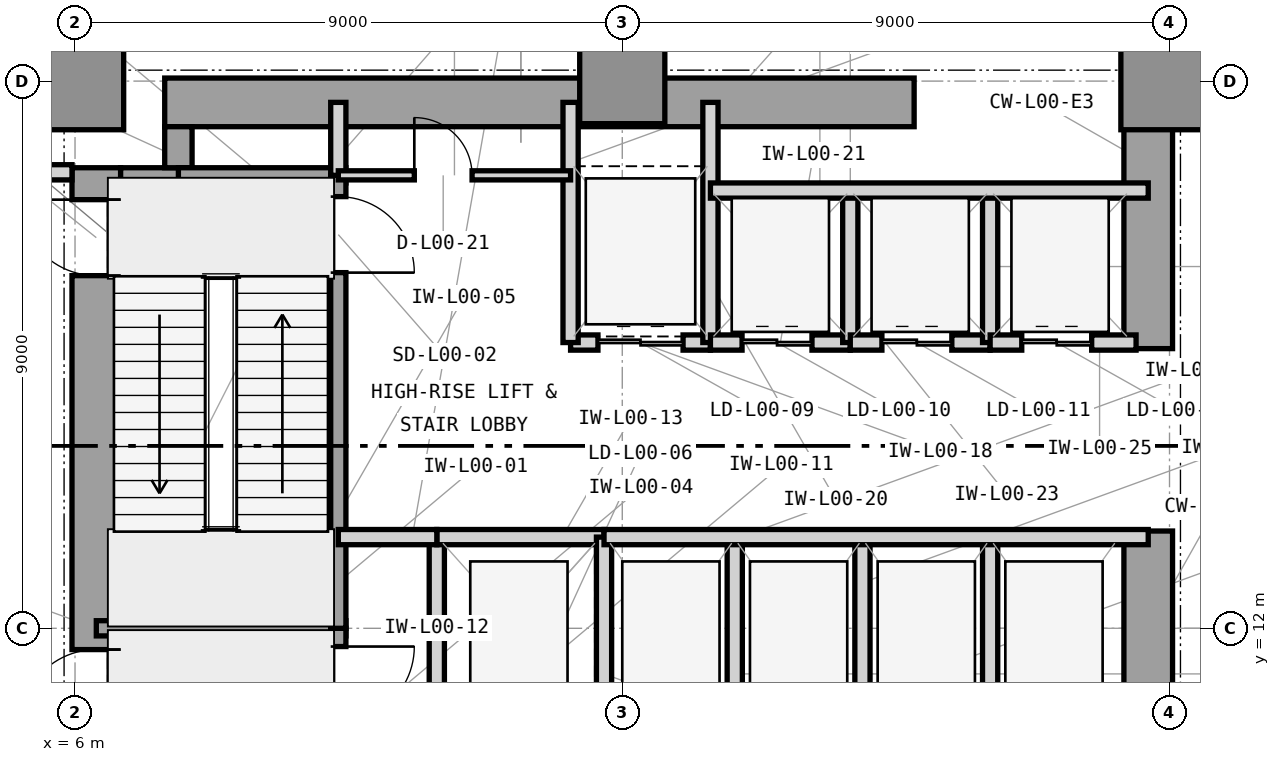
"""IFC4 building model, lengths in metres.
Left out: names, types, materials, properties, quantities, classifications, styles, units other than length and angle.
Written with IfcOpenShell. Run it as: python <this file> out.ifc"""

import sys

from ifc_helpers import new_model, si_unit, direction, frame, frame_2d, origin, origin_2d, place, context, subcontext, project, spatial, rectangle, extrude, element, fill, save


model = new_model("IFC4")
c1 = context("Model", 3, precision=1e-05, world=origin(), true_north=direction((0.0, 1.0)))
c2 = subcontext(c1, "Body", "Model", "MODEL_VIEW")
j1 = project(units=[si_unit("LENGTHUNIT", "METRE"), si_unit("PLANEANGLEUNIT", "RADIAN")], contexts=[c1])
p1 = place(None, origin())
s1 = spatial("IfcSite", under=j1, at=p1, CompositionType="ELEMENT")
p2 = place(p1, origin())
s2 = spatial("IfcBuilding", under=s1, at=p2, CompositionType="ELEMENT")
p3 = place(p2, origin())
s3 = spatial("IfcBuildingStorey", under=s2, at=p3, CompositionType="ELEMENT", Elevation=0.0)
p4 = place(p3, frame((6.35, 4.425, 0.0), z_axis=(0.0, 0.0, 1.0), x_axis=(0.0, 1.0, 0.0)))
e1 = element("IfcWall", 1, at=p4, inside=s3, PredefinedType="SHEAR", context=c2, shape_type="SweptSolid", body=[
    extrude(rectangle(XDim=15.15, YDim=0.8, at=frame_2d((7.575, 0.0))), origin(), (0.0, 0.0, 1.0), 5.4),
])
p5 = place(p4, frame((5.975, 0.0, 0.0)))
e2 = element("IfcOpeningElement", 2, at=p5, cuts=e1, PredefinedType="OPENING", context=c2, shape_type="SweptSolid", body=[
    extrude(rectangle(XDim=1.25, YDim=2.2, at=frame_2d((0.625, 1.1))), frame((0.0, 0.41, 0.0), z_axis=(0.0, -1.0, 0.0), x_axis=(1.0, 0.0, 0.0)), (0.0, 0.0, 1.0), 0.82),
])
p6 = place(p4, frame((13.375, 0.0, 0.0)))
e3 = element("IfcOpeningElement", 3, at=p6, cuts=e1, PredefinedType="OPENING", context=c2, shape_type="SweptSolid", body=[
    extrude(rectangle(XDim=1.25, YDim=2.2, at=frame_2d((0.625, 1.1))), frame((0.0, 0.41, 0.0), z_axis=(0.0, -1.0, 0.0), x_axis=(1.0, 0.0, 0.0)), (0.0, 0.0, 1.0), 0.82),
])
p7 = place(p3, frame((7.475, 20.65, 0.0), z_axis=(0.0, 0.0, 1.0), x_axis=(1.0, 0.0, 0.0)))
e4 = element("IfcWall", 4, at=p7, inside=s3, PredefinedType="SHEAR", context=c2, shape_type="SweptSolid", body=[
    extrude(rectangle(XDim=12.325, YDim=0.8, at=frame_2d((6.163, 0.0))), origin(), (0.0, 0.0, 1.0), 5.4),
])
p8 = place(p3, frame((23.65, 10.4, 0.0), z_axis=(0.0, 0.0, 1.0), x_axis=(0.0, 1.0, 0.0)))
e5 = element("IfcWall", 5, at=p8, inside=s3, PredefinedType="SHEAR", context=c2, shape_type="SweptSolid", body=[
    extrude(rectangle(XDim=3.2, YDim=0.8, at=frame_2d((1.6, 0.0))), origin(), (0.0, 0.0, 1.0), 5.4),
])
p9 = place(p3, frame((23.65, 16.6, 0.0), z_axis=(0.0, 0.0, 1.0), x_axis=(0.0, 1.0, 0.0)))
e6 = element("IfcWall", 6, at=p9, inside=s3, PredefinedType="SHEAR", context=c2, shape_type="SweptSolid", body=[
    extrude(rectangle(XDim=4.05, YDim=0.8, at=frame_2d((2.025, 0.0))), origin(), (0.0, 0.0, 1.0), 5.4),
])
p10 = place(p3, frame((6.75, 19.35, 0.0), z_axis=(0.0, 0.0, 1.0), x_axis=(1.0, 0.0, 0.0)))
e7 = element("IfcWall", 7, at=p10, inside=s3, PredefinedType="SHEAR", context=c2, shape_type="SweptSolid", body=[
    extrude(rectangle(XDim=1.175, YDim=0.45, at=frame_2d((0.587, 0.0))), origin(), (0.0, 0.0, 1.0), 5.4),
])
p11 = place(p3, frame((7.7, 19.575, 0.0), z_axis=(0.0, 0.0, 1.0), x_axis=(0.0, 1.0, 0.0)))
e8 = element("IfcWall", 8, at=p11, inside=s3, PredefinedType="SHEAR", context=c2, shape_type="SweptSolid", body=[
    extrude(rectangle(XDim=0.675, YDim=0.45, at=frame_2d((0.337, 0.0))), origin(), (0.0, 0.0, 1.0), 5.4),
])
p12 = place(p3, frame((6.0, 21.0, 0.0), z_axis=(0.0, 0.0, 1.0), x_axis=(1.0, 0.0, 0.0)))
e9 = element("IfcColumn", 9, at=p12, inside=s3, PredefinedType="COLUMN", context=c2, shape_type="SweptSolid", body=[
    extrude(rectangle(XDim=1.6, YDim=1.6, at=origin_2d()), origin(), (0.0, 0.0, 1.0), 5.4),
])
p13 = place(p3, frame((15.0, 21.0, 0.0), z_axis=(0.0, 0.0, 1.0), x_axis=(1.0, 0.0, 0.0)))
e10 = element("IfcColumn", 10, at=p13, inside=s3, PredefinedType="COLUMN", context=c2, shape_type="SweptSolid", body=[
    extrude(rectangle(XDim=1.4, YDim=1.4, at=origin_2d()), origin(), (0.0, 0.0, 1.0), 5.4),
])
p14 = place(p3, frame((24.0, 21.0, 0.0), z_axis=(0.0, 0.0, 1.0), x_axis=(1.0, 0.0, 0.0)))
e11 = element("IfcColumn", 11, at=p14, inside=s3, PredefinedType="COLUMN", context=c2, shape_type="SweptSolid", body=[
    extrude(rectangle(XDim=1.6, YDim=1.6, at=origin_2d()), origin(), (0.0, 0.0, 1.0), 5.4),
])
p15 = place(p3, frame((6.35, 12.0, 0.0), z_axis=(0.0, 0.0, 1.0), x_axis=(1.0, 0.0, 0.0)))
e12 = element("IfcWall", 12, at=p15, inside=s3, PredefinedType="SHEAR", context=c2, shape_type="SweptSolid", body=[
    extrude(rectangle(XDim=4.105, YDim=0.25, at=frame_2d((2.052, 0.0))), origin(), (0.0, 0.0, 1.0), 5.4),
])
p16 = place(p3, frame((7.7, 19.45, 0.0), z_axis=(0.0, 0.0, 1.0), x_axis=(1.0, 0.0, 0.0)))
e13 = element("IfcWall", 13, at=p16, inside=s3, PredefinedType="SHEAR", context=c2, shape_type="SweptSolid", body=[
    extrude(rectangle(XDim=2.755, YDim=0.25, at=frame_2d((1.377, 0.0))), origin(), (0.0, 0.0, 1.0), 5.4),
])
p17 = place(p3, frame((10.33, 4.55, 0.0), z_axis=(0.0, 0.0, 1.0), x_axis=(0.0, 1.0, 0.0)))
e14 = element("IfcWall", 14, at=p17, inside=s3, PredefinedType="SHEAR", context=c2, shape_type="SweptSolid", body=[
    extrude(rectangle(XDim=7.45, YDim=0.25, at=frame_2d((3.725, 0.0))), origin(), (0.0, 0.0, 1.0), 5.4),
])
p18 = place(p17, frame((5.9, 0.0, 0.0)))
e15 = element("IfcOpeningElement", 15, at=p18, cuts=e14, PredefinedType="OPENING", context=c2, shape_type="SweptSolid", body=[
    extrude(rectangle(XDim=1.25, YDim=2.2, at=frame_2d((0.625, 1.1))), frame((0.0, 0.135, 0.0), z_axis=(0.0, -1.0, 0.0), x_axis=(1.0, 0.0, 0.0)), (0.0, 0.0, 1.0), 0.27),
])
p19 = place(p3, frame((10.33, 12.0, 0.0), z_axis=(0.0, 0.0, 1.0), x_axis=(0.0, 1.0, 0.0)))
e16 = element("IfcWall", 16, at=p19, inside=s3, PredefinedType="SHEAR", context=c2, shape_type="SweptSolid", body=[
    extrude(rectangle(XDim=7.45, YDim=0.25, at=frame_2d((3.725, 0.0))), origin(), (0.0, 0.0, 1.0), 5.4),
])
p20 = place(p19, frame((5.85, 0.0, 0.0)))
e17 = element("IfcOpeningElement", 17, at=p20, cuts=e16, PredefinedType="OPENING", context=c2, shape_type="SweptSolid", body=[
    extrude(rectangle(XDim=1.25, YDim=2.2, at=frame_2d((0.625, 1.1))), frame((0.0, 0.135, 0.0), z_axis=(0.0, -1.0, 0.0), x_axis=(1.0, 0.0, 0.0)), (0.0, 0.0, 1.0), 0.27),
])
p21 = place(p3, frame((10.33, 19.45, 0.0), z_axis=(0.0, 0.0, 1.0), x_axis=(0.0, 1.0, 0.0)))
e18 = element("IfcWall", 18, at=p21, inside=s3, PredefinedType="PARTITIONING", context=c2, shape_type="SweptSolid", body=[
    extrude(rectangle(XDim=1.2, YDim=0.25, at=frame_2d((0.6, 0.0))), origin(), (0.0, 0.0, 1.0), 4.234),
])
p22 = place(p3, frame((11.95, 10.5, 0.0), z_axis=(0.0, 0.0, 1.0), x_axis=(0.0, 1.0, 0.0)))
e19 = element("IfcWall", 19, at=p22, inside=s3, PredefinedType="PARTITIONING", context=c2, shape_type="SweptSolid", body=[
    extrude(rectangle(XDim=3.0, YDim=0.25, at=frame_2d((1.5, 0.0))), origin(), (0.0, 0.0, 1.0), 5.09),
])
p23 = place(p3, frame((11.95, 13.5, 0.0), z_axis=(0.0, 0.0, 1.0), x_axis=(1.0, 0.0, 0.0)))
e20 = element("IfcWall", 20, at=p23, inside=s3, PredefinedType="PARTITIONING", context=c2, shape_type="SweptSolid", body=[
    extrude(rectangle(XDim=2.75, YDim=0.25, at=frame_2d((1.375, 0.0))), origin(), (0.0, 0.0, 1.0), 4.473),
])
p24 = place(p3, frame((14.7, 10.5, 0.0), z_axis=(0.0, 0.0, 1.0), x_axis=(0.0, 1.0, 0.0)))
e21 = element("IfcWall", 21, at=p24, inside=s3, PredefinedType="PARTITIONING", context=c2, shape_type="SweptSolid", body=[
    extrude(rectangle(XDim=3.0, YDim=0.25, at=frame_2d((1.5, 0.0))), origin(), (0.0, 0.0, 1.0), 5.09),
])
p25 = place(p3, frame((10.33, 13.5, 0.0), z_axis=(0.0, 0.0, 1.0), x_axis=(1.0, 0.0, 0.0)))
e22 = element("IfcWall", 22, at=p25, inside=s3, PredefinedType="PARTITIONING", context=c2, shape_type="SweptSolid", body=[
    extrude(rectangle(XDim=1.62, YDim=0.25, at=frame_2d((0.81, 0.0))), origin(), (0.0, 0.0, 1.0), 4.473),
])
p26 = place(p3, frame((14.15, 16.7, 0.0), z_axis=(0.0, 0.0, 1.0), x_axis=(1.0, 0.0, 0.0)))
e23 = element("IfcWall", 23, at=p26, inside=s3, PredefinedType="PARTITIONING", context=c2, shape_type="SweptSolid", body=[
    extrude(rectangle(XDim=2.3, YDim=0.25, at=frame_2d((1.15, 0.0))), origin(), (0.0, 0.0, 1.0), 4.473),
])
p27 = place(p26, frame((0.45, 0.0, 0.0)))
e24 = element("IfcOpeningElement", 24, at=p27, cuts=e23, PredefinedType="OPENING", context=c2, shape_type="SweptSolid", body=[
    extrude(rectangle(XDim=1.4, YDim=2.35, at=frame_2d((0.7, 1.175))), frame((0.0, 0.135, 0.0), z_axis=(0.0, -1.0, 0.0), x_axis=(1.0, 0.0, 0.0)), (0.0, 0.0, 1.0), 0.27),
])
for number, where, z_axis, x_axis in (
    (25, (14.15, 16.7, 0.0), (0.0, 0.0, 1.0), (0.0, 1.0, 0.0)),
    (26, (16.45, 16.7, 0.0), (0.0, 0.0, 1.0), (0.0, 1.0, 0.0)),
):
    element("IfcWall", number, at=place(p3, frame(where, z_axis=z_axis, x_axis=x_axis)), inside=s3, PredefinedType="PARTITIONING", context=c2, shape_type="SweptSolid", body=[
        extrude(rectangle(XDim=3.95, YDim=0.25, at=frame_2d((1.975, 0.0))), origin(), (0.0, 0.0, 1.0), 5.09),
    ])
p28 = place(p3, frame((16.45, 16.7, 0.0), z_axis=(0.0, 0.0, 1.0), x_axis=(1.0, 0.0, 0.0)))
e27 = element("IfcWall", 27, at=p28, inside=s3, PredefinedType="PARTITIONING", context=c2, shape_type="SweptSolid", body=[
    extrude(rectangle(XDim=2.3, YDim=0.25, at=frame_2d((1.15, 0.0))), origin(), (0.0, 0.0, 1.0), 4.473),
])
p29 = place(p28, frame((0.52, 0.0, 0.0)))
e28 = element("IfcOpeningElement", 28, at=p29, cuts=e27, PredefinedType="OPENING", context=c2, shape_type="SweptSolid", body=[
    extrude(rectangle(XDim=1.15, YDim=2.25, at=frame_2d((0.575, 1.125))), frame((0.0, 0.135, 0.0), z_axis=(0.0, -1.0, 0.0), x_axis=(1.0, 0.0, 0.0)), (0.0, 0.0, 1.0), 0.27),
])
p30 = place(p3, frame((18.75, 16.7, 0.0), z_axis=(0.0, 0.0, 1.0), x_axis=(0.0, 1.0, 0.0)))
e29 = element("IfcWall", 29, at=p30, inside=s3, PredefinedType="PARTITIONING", context=c2, shape_type="SweptSolid", body=[
    extrude(rectangle(XDim=2.5, YDim=0.25, at=frame_2d((1.25, 0.0))), origin(), (0.0, 0.0, 1.0), 5.09),
])
p31 = place(p3, frame((18.75, 16.7, 0.0), z_axis=(0.0, 0.0, 1.0), x_axis=(1.0, 0.0, 0.0)))
e30 = element("IfcWall", 30, at=p31, inside=s3, PredefinedType="PARTITIONING", context=c2, shape_type="SweptSolid", body=[
    extrude(rectangle(XDim=2.3, YDim=0.25, at=frame_2d((1.15, 0.0))), origin(), (0.0, 0.0, 1.0), 4.473),
])
p32 = place(p31, frame((0.52, 0.0, 0.0)))
e31 = element("IfcOpeningElement", 31, at=p32, cuts=e30, PredefinedType="OPENING", context=c2, shape_type="SweptSolid", body=[
    extrude(rectangle(XDim=1.15, YDim=2.25, at=frame_2d((0.575, 1.125))), frame((0.0, 0.135, 0.0), z_axis=(0.0, -1.0, 0.0), x_axis=(1.0, 0.0, 0.0)), (0.0, 0.0, 1.0), 0.27),
])
p33 = place(p3, frame((21.05, 16.7, 0.0), z_axis=(0.0, 0.0, 1.0), x_axis=(0.0, 1.0, 0.0)))
e32 = element("IfcWall", 32, at=p33, inside=s3, PredefinedType="PARTITIONING", context=c2, shape_type="SweptSolid", body=[
    extrude(rectangle(XDim=2.5, YDim=0.25, at=frame_2d((1.25, 0.0))), origin(), (0.0, 0.0, 1.0), 5.09),
])
p34 = place(p3, frame((21.05, 16.7, 0.0), z_axis=(0.0, 0.0, 1.0), x_axis=(1.0, 0.0, 0.0)))
e33 = element("IfcWall", 33, at=p34, inside=s3, PredefinedType="PARTITIONING", context=c2, shape_type="SweptSolid", body=[
    extrude(rectangle(XDim=2.4, YDim=0.25, at=frame_2d((1.2, 0.0))), origin(), (0.0, 0.0, 1.0), 4.473),
])
p35 = place(p34, frame((0.52, 0.0, 0.0)))
e34 = element("IfcOpeningElement", 34, at=p35, cuts=e33, PredefinedType="OPENING", context=c2, shape_type="SweptSolid", body=[
    extrude(rectangle(XDim=1.15, YDim=2.25, at=frame_2d((0.575, 1.125))), frame((0.0, 0.135, 0.0), z_axis=(0.0, -1.0, 0.0), x_axis=(1.0, 0.0, 0.0)), (0.0, 0.0, 1.0), 0.27),
])
p36 = place(p3, frame((16.45, 19.2, 0.0), z_axis=(0.0, 0.0, 1.0), x_axis=(1.0, 0.0, 0.0)))
e35 = element("IfcWall", 35, at=p36, inside=s3, PredefinedType="PARTITIONING", context=c2, shape_type="SweptSolid", body=[
    extrude(rectangle(XDim=7.2, YDim=0.25, at=frame_2d((3.6, 0.0))), origin(), (0.0, 0.0, 1.0), 5.09),
])
for number, where, z_axis, x_axis in (
    (36, (16.85, 10.5, 0.0), (0.0, 0.0, 1.0), (0.0, 1.0, 0.0)),
    (37, (18.95, 10.5, 0.0), (0.0, 0.0, 1.0), (0.0, 1.0, 0.0)),
    (38, (21.05, 10.5, 0.0), (0.0, 0.0, 1.0), (0.0, 1.0, 0.0)),
):
    element("IfcWall", number, at=place(p3, frame(where, z_axis=z_axis, x_axis=x_axis)), inside=s3, PredefinedType="PARTITIONING", context=c2, shape_type="SweptSolid", body=[
        extrude(rectangle(XDim=3.0, YDim=0.25, at=frame_2d((1.5, 0.0))), origin(), (0.0, 0.0, 1.0), 5.09),
    ])
p37 = place(p3, frame((14.7, 13.5, 0.0), z_axis=(0.0, 0.0, 1.0), x_axis=(1.0, 0.0, 0.0)))
e39 = element("IfcWall", 39, at=p37, inside=s3, PredefinedType="PARTITIONING", context=c2, shape_type="SweptSolid", body=[
    extrude(rectangle(XDim=8.95, YDim=0.25, at=frame_2d((4.475, 0.0))), origin(), (0.0, 0.0, 1.0), 4.473),
])
p38 = place(p3, frame((10.33, 19.45, 0.0), z_axis=(0.0, 0.0, 1.0), x_axis=(1.0, 0.0, 0.0)))
e40 = element("IfcWall", 40, at=p38, inside=s3, PredefinedType="PARTITIONING", context=c2, shape_type="SweptSolid", body=[
    extrude(rectangle(XDim=3.82, YDim=0.15, at=frame_2d((1.91, 0.0))), origin(), (0.0, 0.0, 1.0), 5.09),
])
p39 = place(p38, frame((1.25, 0.0, 0.0)))
e41 = element("IfcOpeningElement", 41, at=p39, cuts=e40, PredefinedType="OPENING", context=c2, shape_type="SweptSolid", body=[
    extrude(rectangle(XDim=0.95, YDim=2.1, at=frame_2d((0.475, 1.05))), frame((0.0, 0.085, 0.0), z_axis=(0.0, -1.0, 0.0), x_axis=(1.0, 0.0, 0.0)), (0.0, 0.0, 1.0), 0.17),
])
p40 = place(p3, frame((4.05, 19.5, 0.0), z_axis=(0.0, 0.0, 1.0), x_axis=(1.0, 0.0, 0.0)))
e42 = element("IfcWall", 42, at=p40, inside=s3, PredefinedType="PARTITIONING", context=c2, shape_type="SweptSolid", body=[
    extrude(rectangle(XDim=1.9, YDim=0.25, at=frame_2d((0.95, 0.0))), origin(), (0.0, 0.0, 1.0), 5.09),
])
p41 = place(p18, frame((1.25, 0.0, 0.0), z_axis=(0.0, 0.0, 1.0), x_axis=(-1.0, 0.0, 0.0)))
e43 = element("IfcDoor", 43, at=p41, inside=s3, OperationType="SINGLE_SWING_LEFT", PredefinedType="DOOR", context=c2, shape_type="SweptSolid", body=[
    extrude(rectangle(XDim=1.25, YDim=2.2, at=frame_2d((0.625, 1.1))), frame((0.0, 0.025, 0.0), z_axis=(0.0, -1.0, 0.0), x_axis=(1.0, 0.0, 0.0)), (0.0, 0.0, 1.0), 0.05),
])
fill(e15, e43)
p42 = place(p20, frame((1.25, 0.0, 0.0), z_axis=(0.0, 0.0, 1.0), x_axis=(-1.0, 0.0, 0.0)))
e44 = element("IfcDoor", 44, at=p42, inside=s3, OperationType="SINGLE_SWING_RIGHT", PredefinedType="DOOR", context=c2, shape_type="SweptSolid", body=[
    extrude(rectangle(XDim=1.25, YDim=2.2, at=frame_2d((0.625, 1.1))), frame((0.0, 0.025, 0.0), z_axis=(0.0, -1.0, 0.0), x_axis=(1.0, 0.0, 0.0)), (0.0, 0.0, 1.0), 0.05),
])
fill(e17, e44)
p43 = place(p27, origin())
e45 = element("IfcDoor", 45, at=p43, inside=s3, OperationType="DOUBLE_DOOR_SLIDING", PredefinedType="DOOR", context=c2, shape_type="SweptSolid", body=[
    extrude(rectangle(XDim=1.4, YDim=2.35, at=frame_2d((0.7, 1.175))), frame((0.0, 0.025, 0.0), z_axis=(0.0, -1.0, 0.0), x_axis=(1.0, 0.0, 0.0)), (0.0, 0.0, 1.0), 0.05),
])
fill(e24, e45)
p44 = place(p29, origin())
e46 = element("IfcDoor", 46, at=p44, inside=s3, OperationType="DOUBLE_DOOR_SLIDING", PredefinedType="DOOR", context=c2, shape_type="SweptSolid", body=[
    extrude(rectangle(XDim=1.15, YDim=2.25, at=frame_2d((0.575, 1.125))), frame((0.0, 0.025, 0.0), z_axis=(0.0, -1.0, 0.0), x_axis=(1.0, 0.0, 0.0)), (0.0, 0.0, 1.0), 0.05),
])
fill(e28, e46)
p45 = place(p32, origin())
e47 = element("IfcDoor", 47, at=p45, inside=s3, OperationType="DOUBLE_DOOR_SLIDING", PredefinedType="DOOR", context=c2, shape_type="SweptSolid", body=[
    extrude(rectangle(XDim=1.15, YDim=2.25, at=frame_2d((0.575, 1.125))), frame((0.0, 0.025, 0.0), z_axis=(0.0, -1.0, 0.0), x_axis=(1.0, 0.0, 0.0)), (0.0, 0.0, 1.0), 0.05),
])
fill(e31, e47)
p46 = place(p35, origin())
e48 = element("IfcDoor", 48, at=p46, inside=s3, OperationType="DOUBLE_DOOR_SLIDING", PredefinedType="DOOR", context=c2, shape_type="SweptSolid", body=[
    extrude(rectangle(XDim=1.15, YDim=2.25, at=frame_2d((0.575, 1.125))), frame((0.0, 0.025, 0.0), z_axis=(0.0, -1.0, 0.0), x_axis=(1.0, 0.0, 0.0)), (0.0, 0.0, 1.0), 0.05),
])
fill(e34, e48)
p47 = place(p39, origin())
e49 = element("IfcDoor", 49, at=p47, inside=s3, OperationType="SINGLE_SWING_LEFT", PredefinedType="DOOR", context=c2, shape_type="SweptSolid", body=[
    extrude(rectangle(XDim=0.95, YDim=2.1, at=frame_2d((0.475, 1.05))), frame((0.0, 0.025, 0.0), z_axis=(0.0, -1.0, 0.0), x_axis=(1.0, 0.0, 0.0)), (0.0, 0.0, 1.0), 0.05),
])
fill(e41, e49)
p48 = place(p5, origin())
e50 = element("IfcDoor", 50, at=p48, inside=s3, OperationType="SINGLE_SWING_LEFT", PredefinedType="DOOR", context=c2, shape_type="SweptSolid", body=[
    extrude(rectangle(XDim=1.25, YDim=2.2, at=frame_2d((0.625, 1.1))), frame((0.0, 0.025, 0.0), z_axis=(0.0, -1.0, 0.0), x_axis=(1.0, 0.0, 0.0)), (0.0, 0.0, 1.0), 0.05),
])
fill(e2, e50)
p49 = place(p6, origin())
e51 = element("IfcDoor", 51, at=p49, inside=s3, OperationType="SINGLE_SWING_RIGHT", PredefinedType="DOOR", context=c2, shape_type="SweptSolid", body=[
    extrude(rectangle(XDim=1.25, YDim=2.2, at=frame_2d((0.625, 1.1))), frame((0.0, 0.025, 0.0), z_axis=(0.0, -1.0, 0.0), x_axis=(1.0, 0.0, 0.0)), (0.0, 0.0, 1.0), 0.05),
])
fill(e3, e51)
save(model, sys.argv[1])
